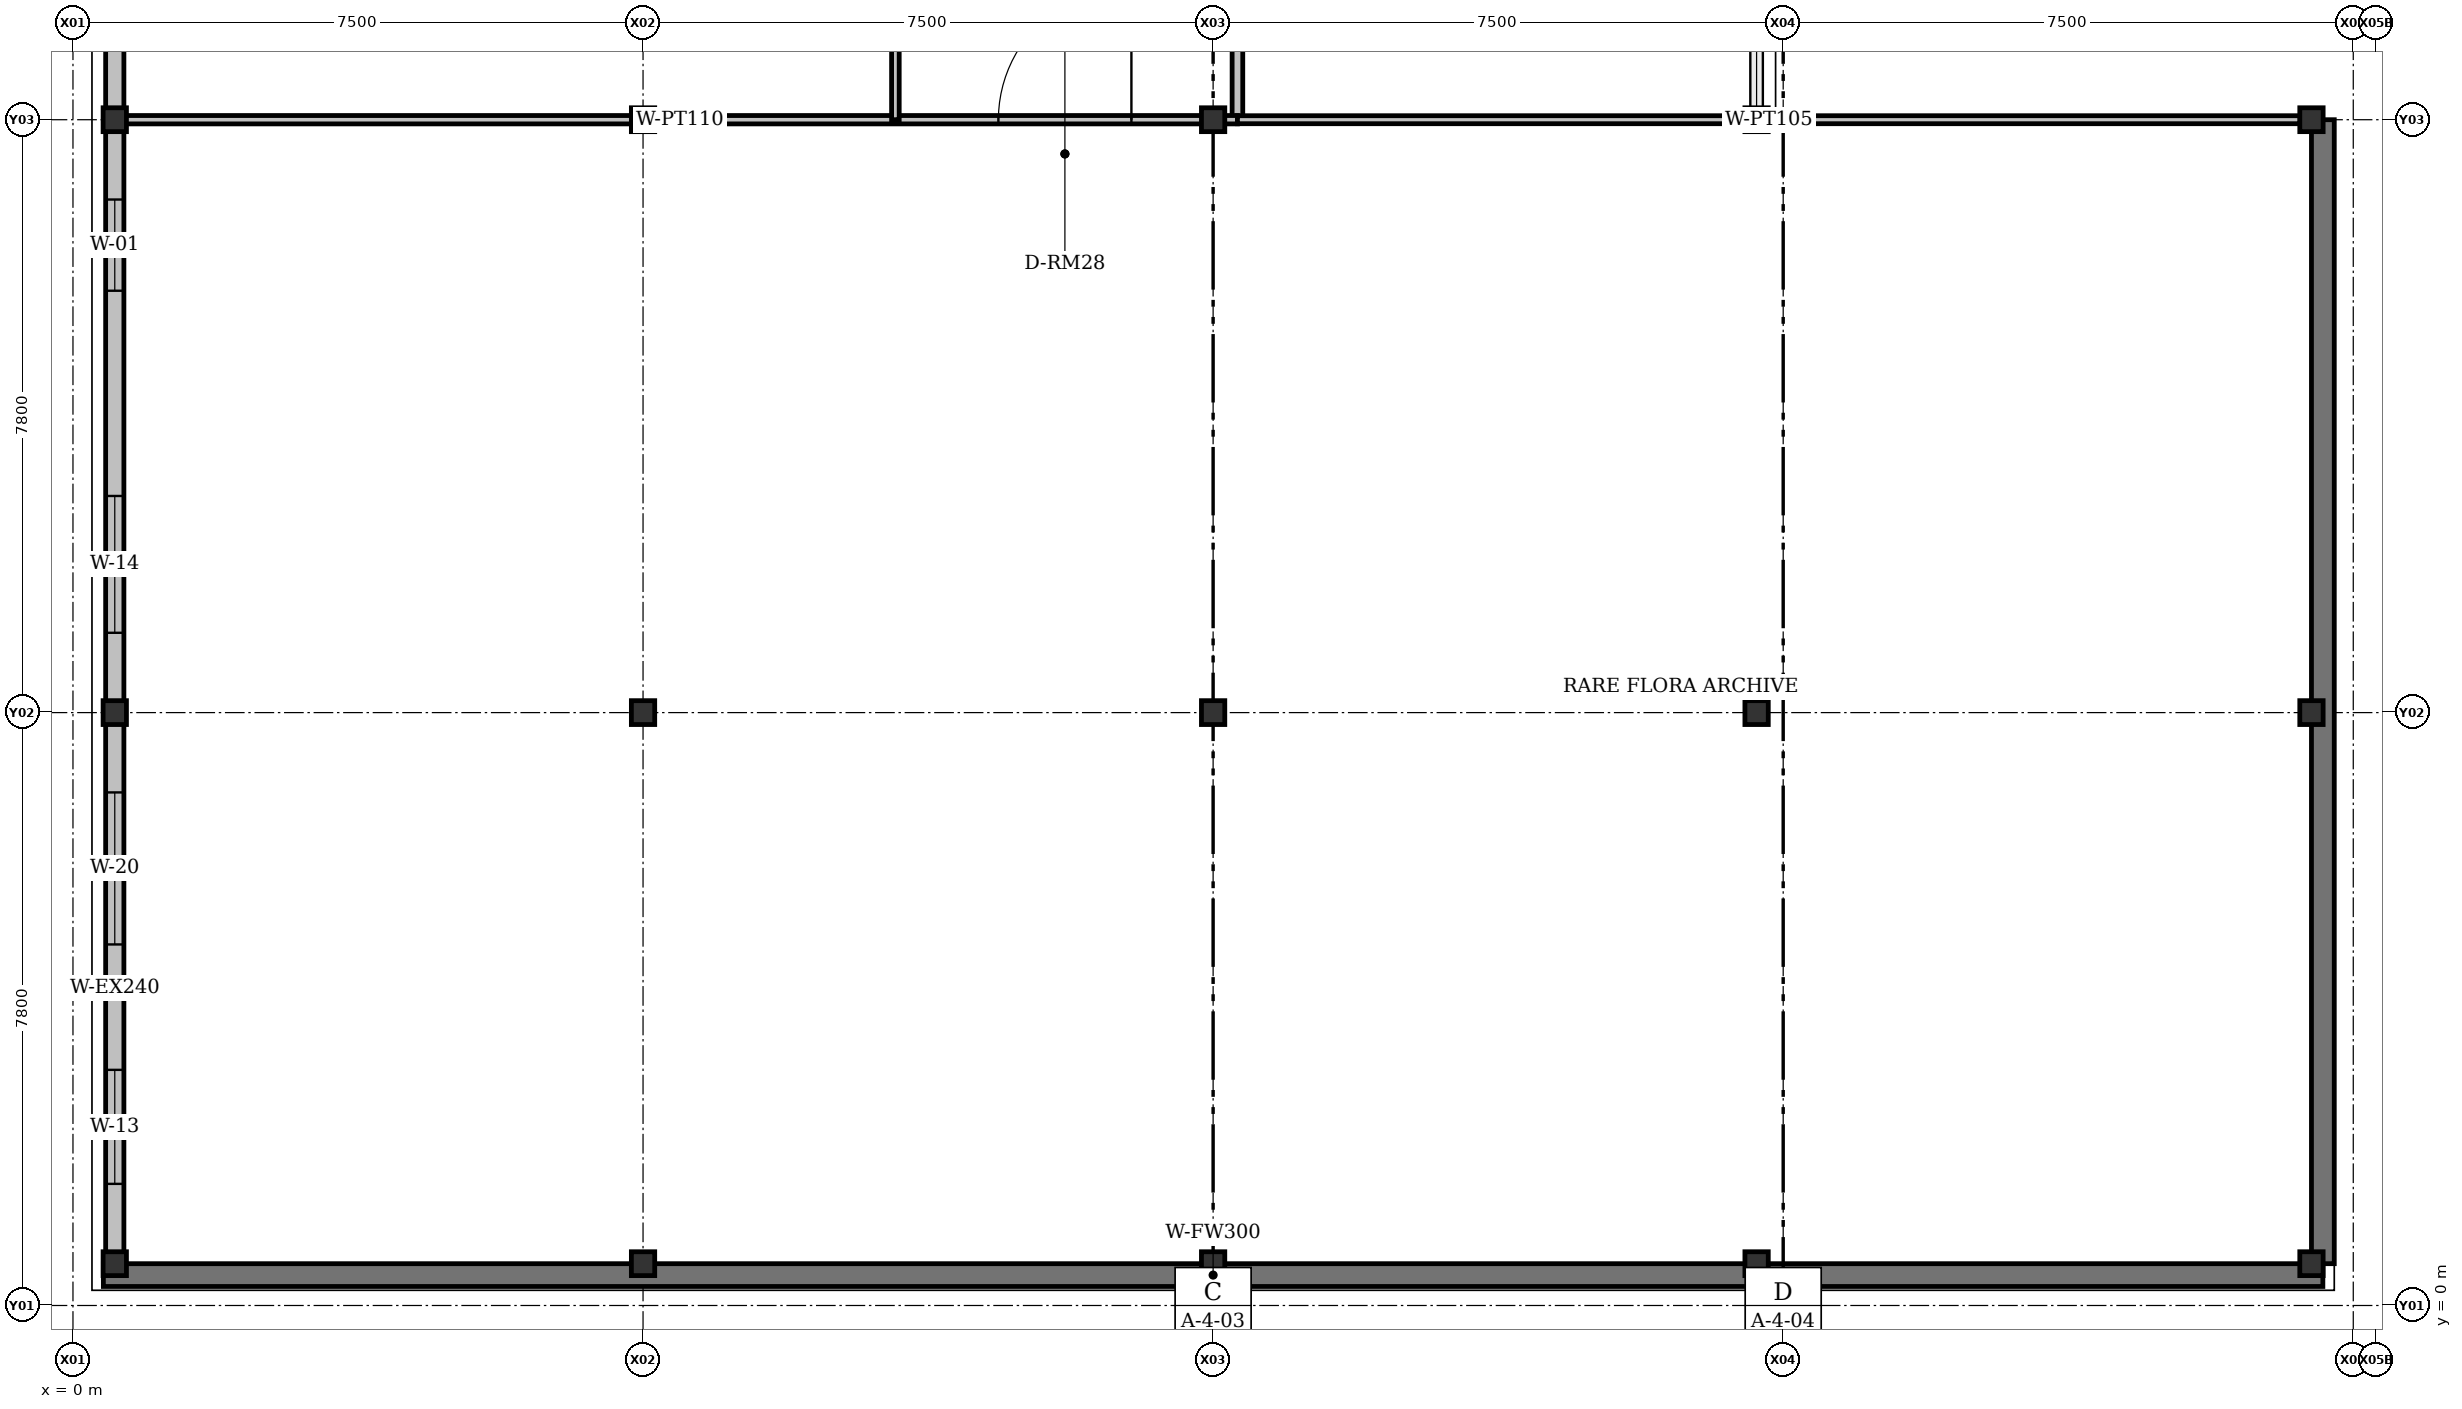
"""IFC4 building model, lengths in metres.
Left out: names, types, materials, properties, quantities, classifications, styles, units other than length and angle.
Written with IfcOpenShell. Run it as: python <this file> out.ifc"""

import sys

from ifc_helpers import new_model, si_unit, direction, frame, frame_2d, origin, origin_2d, place, context, subcontext, project, spatial, rectangle, i_section, extrude, element, fill, save


model = new_model("IFC4")
c1 = context("Model", 3, precision=1e-05, world=origin(), true_north=direction((0.0, 1.0)))
c2 = subcontext(c1, "Body", "Model", "MODEL_VIEW")
j1 = project(units=[si_unit("LENGTHUNIT", "METRE"), si_unit("PLANEANGLEUNIT", "RADIAN")], contexts=[c1])
p1 = place(None, origin())
s1 = spatial("IfcSite", under=j1, at=p1, CompositionType="ELEMENT")
p2 = place(p1, origin())
s2 = spatial("IfcBuilding", under=s1, at=p2, CompositionType="ELEMENT")
p3 = place(p2, frame((0.0, 0.0, 9.9)))
s3 = spatial("IfcBuildingStorey", under=s2, at=p3, CompositionType="ELEMENT", Elevation=9.9)
for number, where, z_axis, x_axis in (
    (1, (0.55, 0.55, 0.0), (0.0, 0.0, 1.0), (1.0, 0.0, 0.0)),
    (2, (0.55, 7.8, 0.0), (0.0, 0.0, 1.0), (1.0, 0.0, 0.0)),
    (3, (0.55, 15.6, 0.0), (0.0, 0.0, 1.0), (1.0, 0.0, 0.0)),
    (4, (7.5, 0.55, 0.0), (0.0, 0.0, 1.0), (1.0, 0.0, 0.0)),
    (5, (7.5, 7.8, 0.0), (0.0, 0.0, 1.0), (1.0, 0.0, 0.0)),
    (6, (7.5, 15.6, 0.0), (0.0, 0.0, 1.0), (1.0, 0.0, 0.0)),
    (7, (15.0, 0.55, 0.0), (0.0, 0.0, 1.0), (1.0, 0.0, 0.0)),
    (8, (15.0, 7.8, 0.0), (0.0, 0.0, 1.0), (1.0, 0.0, 0.0)),
    (9, (15.0, 15.6, 0.0), (0.0, 0.0, 1.0), (1.0, 0.0, 0.0)),
    (10, (22.15, 0.55, 0.0), (0.0, 0.0, 1.0), (1.0, 0.0, 0.0)),
    (11, (22.15, 7.8, 0.0), (0.0, 0.0, 1.0), (1.0, 0.0, 0.0)),
    (12, (22.15, 15.6, 0.0), (0.0, 0.0, 1.0), (1.0, 0.0, 0.0)),
    (13, (29.45, 0.55, 0.0), (0.0, 0.0, 1.0), (1.0, 0.0, 0.0)),
    (14, (29.45, 7.8, 0.0), (0.0, 0.0, 1.0), (1.0, 0.0, 0.0)),
    (15, (29.45, 15.6, 0.0), (0.0, 0.0, 1.0), (1.0, 0.0, 0.0)),
):
    element("IfcColumn", number, at=place(p3, frame(where, z_axis=z_axis, x_axis=x_axis)), inside=s3, PredefinedType="COLUMN", context=c2, shape_type="SweptSolid", body=[
        extrude(i_section(OverallWidth=0.307, OverallDepth=0.314, WebThickness=0.012, FlangeThickness=0.019, FilletRadius=0.015, at=origin_2d()), origin(), (0.0, 0.0, 1.0), 4.2),
    ])
p4 = place(p3, frame((29.6, 0.4, 0.0), z_axis=(0.0, 0.0, 1.0), x_axis=(-1.0, 0.0, 0.0)))
e16 = element("IfcWall", 16, at=p4, inside=s3, PredefinedType="SOLIDWALL", context=c2, shape_type="SweptSolid", body=[
    extrude(rectangle(XDim=29.2, YDim=0.3, at=frame_2d((14.6, 0.0))), origin(), (0.0, 0.0, 1.0), 4.01),
])
p5 = place(p3, frame((29.6, 15.6, 0.0), z_axis=(0.0, 0.0, 1.0), x_axis=(0.0, -1.0, 0.0)))
e17 = element("IfcWall", 17, at=p5, inside=s3, PredefinedType="SOLIDWALL", context=c2, shape_type="SweptSolid", body=[
    extrude(rectangle(XDim=15.05, YDim=0.3, at=frame_2d((7.525, 0.0))), origin(), (0.0, 0.0, 1.0), 4.01),
])
p6 = place(p3, frame((0.55, 0.55, 0.0), z_axis=(0.0, 0.0, 1.0), x_axis=(0.0, 1.0, 0.0)))
e18 = element("IfcWall", 18, at=p6, inside=s3, PredefinedType="SOLIDWALL", context=c2, shape_type="SweptSolid", body=[
    extrude(rectangle(XDim=7.25, YDim=0.24, at=frame_2d((3.625, 0.0))), origin(), (0.0, 0.0, 1.0), 3.542),
])
p7 = place(p6, frame((1.05, 0.0, 0.92)))
e19 = element("IfcOpeningElement", 19, at=p7, cuts=e18, PredefinedType="OPENING", context=c2, shape_type="SweptSolid", body=[
    extrude(rectangle(XDim=1.5, YDim=1.7, at=frame_2d((0.75, 0.85))), frame((0.0, 0.12, 0.0), z_axis=(0.0, -1.0, 0.0), x_axis=(1.0, 0.0, 0.0)), (0.0, 0.0, 1.0), 0.24),
])
p8 = place(p6, frame((4.2, 0.0, 0.92)))
e20 = element("IfcOpeningElement", 20, at=p8, cuts=e18, PredefinedType="OPENING", context=c2, shape_type="SweptSolid", body=[
    extrude(rectangle(XDim=2.0, YDim=1.35, at=frame_2d((1.0, 0.675))), frame((0.0, 0.12, 0.0), z_axis=(0.0, -1.0, 0.0), x_axis=(1.0, 0.0, 0.0)), (0.0, 0.0, 1.0), 0.24),
])
p9 = place(p3, frame((0.55, 7.8, 0.0), z_axis=(0.0, 0.0, 1.0), x_axis=(0.0, 1.0, 0.0)))
e21 = element("IfcWall", 21, at=p9, inside=s3, PredefinedType="SOLIDWALL", context=c2, shape_type="SweptSolid", body=[
    extrude(rectangle(XDim=7.8, YDim=0.24, at=frame_2d((3.9, 0.0))), origin(), (0.0, 0.0, 1.0), 3.542),
])
p10 = place(p9, frame((1.05, 0.0, 0.92)))
e22 = element("IfcOpeningElement", 22, at=p10, cuts=e21, PredefinedType="OPENING", context=c2, shape_type="SweptSolid", body=[
    extrude(rectangle(XDim=1.8, YDim=1.7, at=frame_2d((0.9, 0.85))), frame((0.0, 0.12, 0.0), z_axis=(0.0, -1.0, 0.0), x_axis=(1.0, 0.0, 0.0)), (0.0, 0.0, 1.0), 0.24),
])
p11 = place(p9, frame((5.55, 0.0, 0.92)))
e23 = element("IfcOpeningElement", 23, at=p11, cuts=e21, PredefinedType="OPENING", context=c2, shape_type="SweptSolid", body=[
    extrude(rectangle(XDim=1.2, YDim=1.4, at=frame_2d((0.6, 0.7))), frame((0.0, 0.12, 0.0), z_axis=(0.0, -1.0, 0.0), x_axis=(1.0, 0.0, 0.0)), (0.0, 0.0, 1.0), 0.24),
])
p12 = place(p3, frame((0.55, 15.6, 0.0), z_axis=(0.0, 0.0, 1.0), x_axis=(0.0, 1.0, 0.0)))
e24 = element("IfcWall", 24, at=p12, inside=s3, PredefinedType="SOLIDWALL", context=c2, shape_type="SweptSolid", body=[
    extrude(rectangle(XDim=7.8, YDim=0.24, at=frame_2d((3.9, 0.0))), origin(), (0.0, 0.0, 1.0), 3.542),
])
p13 = place(p12, frame((1.05, 0.0, 0.92)))
e25 = element("IfcOpeningElement", 25, at=p13, cuts=e24, PredefinedType="OPENING", context=c2, shape_type="SweptSolid", body=[
    extrude(rectangle(XDim=2.1, YDim=1.7, at=frame_2d((1.05, 0.85))), frame((0.0, 0.12, 0.0), z_axis=(0.0, -1.0, 0.0), x_axis=(1.0, 0.0, 0.0)), (0.0, 0.0, 1.0), 0.24),
])
p14 = place(p12, frame((5.4, 0.0, 0.92)))
e26 = element("IfcOpeningElement", 26, at=p14, cuts=e24, PredefinedType="OPENING", context=c2, shape_type="SweptSolid", body=[
    extrude(rectangle(XDim=1.35, YDim=1.4, at=frame_2d((0.675, 0.7))), frame((0.0, 0.12, 0.0), z_axis=(0.0, -1.0, 0.0), x_axis=(1.0, 0.0, 0.0)), (0.0, 0.0, 1.0), 0.24),
])
p15 = place(p3, frame((15.32, 15.6, 0.0), z_axis=(0.0, 0.0, 1.0), x_axis=(0.0, 1.0, 0.0)))
e27 = element("IfcWall", 27, at=p15, inside=s3, PredefinedType="PARTITIONING", context=c2, shape_type="SweptSolid", body=[
    extrude(rectangle(XDim=1.78, YDim=0.14, at=frame_2d((0.89, 0.0))), origin(), (0.0, 0.0, 1.0), 3.466),
])
p16 = place(p3, frame((0.65, 15.6, 0.0), z_axis=(0.0, 0.0, 1.0), x_axis=(1.0, 0.0, 0.0)))
e28 = element("IfcWall", 28, at=p16, inside=s3, PredefinedType="PARTITIONING", context=c2, shape_type="SweptSolid", body=[
    extrude(rectangle(XDim=14.67, YDim=0.11, at=frame_2d((7.335, 0.0))), origin(), (0.0, 0.0, 1.0), 3.466),
])
p17 = place(p16, frame((11.525, 0.0, 0.0)))
e29 = element("IfcOpeningElement", 29, at=p17, cuts=e28, PredefinedType="OPENING", context=c2, shape_type="SweptSolid", body=[
    extrude(rectangle(XDim=1.75, YDim=2.35, at=frame_2d((0.875, 1.175))), frame((0.0, 0.055, 0.0), z_axis=(0.0, -1.0, 0.0), x_axis=(1.0, 0.0, 0.0)), (0.0, 0.0, 1.0), 0.11),
])
p18 = place(p3, frame((29.302, 15.6, 0.0), z_axis=(0.0, 0.0, 1.0), x_axis=(-1.0, 0.0, 0.0)))
e30 = element("IfcWall", 30, at=p18, inside=s3, PredefinedType="PARTITIONING", context=c2, shape_type="SweptSolid", body=[
    extrude(rectangle(XDim=13.981, YDim=0.105, at=frame_2d((6.991, 0.0))), origin(), (0.0, 0.0, 1.0), 3.466),
])
p19 = place(p3, frame((10.82, 15.6, 0.0), z_axis=(0.0, 0.0, 1.0), x_axis=(0.0, 1.0, 0.0)))
e31 = element("IfcWall", 31, at=p19, inside=s3, PredefinedType="PARTITIONING", context=c2, shape_type="SweptSolid", body=[
    extrude(rectangle(XDim=38.55, YDim=0.1, at=frame_2d((19.275, 0.0))), origin(), (0.0, 0.0, 1.0), 3.466),
])
p20 = place(p19, frame((18.075, 0.0, 0.0)))
e32 = element("IfcOpeningElement", 32, at=p20, cuts=e31, PredefinedType="OPENING", context=c2, shape_type="SweptSolid", body=[
    extrude(rectangle(XDim=1.85, YDim=2.35, at=frame_2d((0.925, 1.175))), frame((0.0, 0.05, 0.0), z_axis=(0.0, -1.0, 0.0), x_axis=(1.0, 0.0, 0.0)), (0.0, 0.0, 1.0), 0.1),
])
p21 = place(p19, frame((20.775, 0.0, 0.92)))
e33 = element("IfcOpeningElement", 33, at=p21, cuts=e31, PredefinedType="OPENING", context=c2, shape_type="SweptSolid", body=[
    extrude(rectangle(XDim=0.9, YDim=1.2, at=frame_2d((0.45, 0.6))), frame((0.0, 0.05, 0.0), z_axis=(0.0, -1.0, 0.0), x_axis=(1.0, 0.0, 0.0)), (0.0, 0.0, 1.0), 0.1),
])
p22 = place(p7, origin())
e34 = element("IfcWindow", 34, at=p22, inside=s3, PartitioningType="SINGLE_PANEL", PredefinedType="WINDOW", context=c2, shape_type="SweptSolid", body=[
    extrude(rectangle(XDim=1.5, YDim=1.7, at=frame_2d((0.75, 0.85))), frame((0.0, 0.03, 0.0), z_axis=(0.0, -1.0, 0.0), x_axis=(1.0, 0.0, 0.0)), (0.0, 0.0, 1.0), 0.06),
])
fill(e19, e34)
p23 = place(p8, origin())
e35 = element("IfcWindow", 35, at=p23, inside=s3, PartitioningType="DOUBLE_PANEL_VERTICAL", PredefinedType="WINDOW", context=c2, shape_type="SweptSolid", body=[
    extrude(rectangle(XDim=2.0, YDim=1.35, at=frame_2d((1.0, 0.675))), frame((0.0, 0.03, 0.0), z_axis=(0.0, -1.0, 0.0), x_axis=(1.0, 0.0, 0.0)), (0.0, 0.0, 1.0), 0.06),
])
fill(e20, e35)
p24 = place(p10, origin())
e36 = element("IfcWindow", 36, at=p24, inside=s3, PartitioningType="DOUBLE_PANEL_VERTICAL", PredefinedType="WINDOW", context=c2, shape_type="SweptSolid", body=[
    extrude(rectangle(XDim=1.8, YDim=1.7, at=frame_2d((0.9, 0.85))), frame((0.0, 0.03, 0.0), z_axis=(0.0, -1.0, 0.0), x_axis=(1.0, 0.0, 0.0)), (0.0, 0.0, 1.0), 0.06),
])
fill(e22, e36)
p25 = place(p11, origin())
e37 = element("IfcWindow", 37, at=p25, inside=s3, PartitioningType="SINGLE_PANEL", PredefinedType="WINDOW", context=c2, shape_type="SweptSolid", body=[
    extrude(rectangle(XDim=1.2, YDim=1.4, at=frame_2d((0.6, 0.7))), frame((0.0, 0.03, 0.0), z_axis=(0.0, -1.0, 0.0), x_axis=(1.0, 0.0, 0.0)), (0.0, 0.0, 1.0), 0.06),
])
fill(e23, e37)
p26 = place(p17, origin())
e38 = element("IfcDoor", 38, at=p26, inside=s3, OperationType="SINGLE_SWING_RIGHT", PredefinedType="DOOR", context=c2, shape_type="SweptSolid", body=[
    extrude(rectangle(XDim=1.75, YDim=2.35, at=frame_2d((0.875, 1.175))), frame((0.0, 0.025, 0.0), z_axis=(0.0, -1.0, 0.0), x_axis=(1.0, 0.0, 0.0)), (0.0, 0.0, 1.0), 0.05),
])
fill(e29, e38)
save(model, sys.argv[1])
